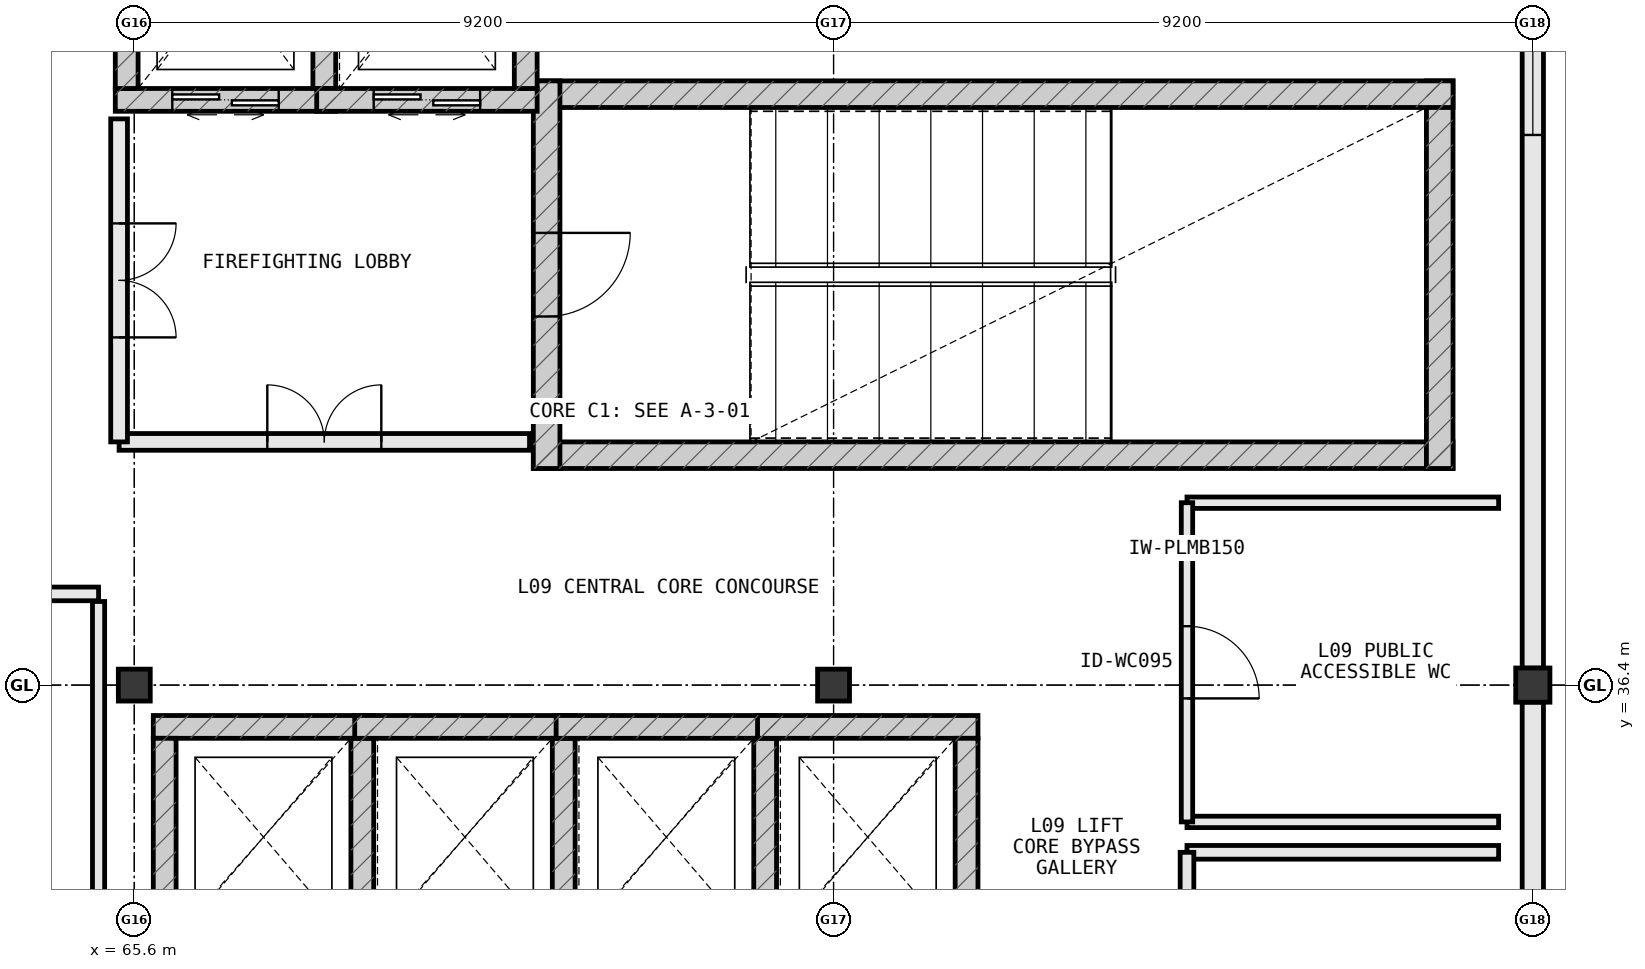
"""IFC4 building model, lengths in metres.
Left out: names, types, materials, properties, quantities, classifications, styles, units other than length and angle.
Written with IfcOpenShell. Run it as: python <this file> out.ifc"""

import sys

from ifc_helpers import new_model, si_unit, direction, frame, frame_2d, origin, origin_2d, place, context, subcontext, project, spatial, rectangle, extrude, element, fill, save


model = new_model("IFC4")
c1 = context("Model", 3, precision=1e-05, world=origin(), true_north=direction((0.0, 1.0)))
c2 = subcontext(c1, "Body", "Model", "MODEL_VIEW")
j1 = project(units=[si_unit("LENGTHUNIT", "METRE"), si_unit("PLANEANGLEUNIT", "RADIAN")], contexts=[c1])
p1 = place(None, origin())
s1 = spatial("IfcSite", under=j1, at=p1, CompositionType="ELEMENT")
p2 = place(p1, origin())
s2 = spatial("IfcBuilding", under=s1, at=p2, CompositionType="ELEMENT")
p3 = place(p2, frame((0.0, 0.0, 39.0)))
s3 = spatial("IfcBuildingStorey", under=s2, at=p3, CompositionType="ELEMENT", Elevation=39.0)
p4 = place(p3, frame((74.8, 36.4, 0.0), z_axis=(0.0, 0.0, 1.0), x_axis=(1.0, 0.0, 0.0)))
e1 = element("IfcColumn", 1, at=p4, inside=s3, PredefinedType="COLUMN", context=c2, shape_type="SweptSolid", body=[
    extrude(rectangle(XDim=0.42, YDim=0.42, at=origin_2d()), origin(), (0.0, 0.0, 1.0), 3.8),
])
p5 = place(p3, frame((84.0, 36.4, 0.0), z_axis=(0.0, 0.0, 1.0), x_axis=(1.0, 0.0, 0.0)))
e2 = element("IfcColumn", 2, at=p5, inside=s3, PredefinedType="COLUMN", context=c2, shape_type="SweptSolid", body=[
    extrude(rectangle(XDim=0.45, YDim=0.45, at=origin_2d()), origin(), (0.0, 0.0, 1.0), 3.8),
])
p6 = place(p3, frame((65.6, 36.4, 0.0), z_axis=(0.0, 0.0, 1.0), x_axis=(1.0, 0.0, 0.0)))
e3 = element("IfcColumn", 3, at=p6, inside=s3, PredefinedType="COLUMN", context=c2, shape_type="SweptSolid", body=[
    extrude(rectangle(XDim=0.42, YDim=0.42, at=origin_2d()), origin(), (0.0, 0.0, 1.0), 3.8),
])
p7 = place(p3, frame((84.0, 27.223, 0.0), z_axis=(0.0, 0.0, 1.0), x_axis=(0.0, 1.0, 0.0)))
e4 = element("IfcWall", 4, at=p7, inside=s3, PredefinedType="STANDARD", context=c2, shape_type="SweptSolid", body=[
    extrude(rectangle(XDim=8.954, YDim=0.28, at=frame_2d((4.477, 0.0))), origin(), (0.0, 0.0, 1.0), 2.98),
])
p8 = place(p7, frame((3.727, 0.0, 0.85)))
e5 = element("IfcOpeningElement", 5, at=p8, cuts=e4, PredefinedType="OPENING", context=c2, shape_type="SweptSolid", body=[
    extrude(rectangle(XDim=1.5, YDim=1.75, at=frame_2d((0.75, 0.875))), frame((0.0, 0.152, 0.0), z_axis=(0.0, -1.0, 0.0), x_axis=(1.0, 0.0, 0.0)), (0.0, 0.0, 1.0), 0.304),
])
p9 = place(p3, frame((84.0, 36.623, 0.0), z_axis=(0.0, 0.0, 1.0), x_axis=(0.0, 1.0, 0.0)))
e6 = element("IfcWall", 6, at=p9, inside=s3, PredefinedType="STANDARD", context=c2, shape_type="SweptSolid", body=[
    extrude(rectangle(XDim=10.354, YDim=0.28, at=frame_2d((5.177, 0.0))), origin(), (0.0, 0.0, 1.0), 2.98),
])
p10 = place(p9, frame((7.015, 0.0, 0.85)))
e7 = element("IfcOpeningElement", 7, at=p10, cuts=e6, PredefinedType="OPENING", context=c2, shape_type="SweptSolid", body=[
    extrude(rectangle(XDim=1.5, YDim=1.75, at=frame_2d((0.75, 0.875))), frame((0.0, 0.152, 0.0), z_axis=(0.0, -1.0, 0.0), x_axis=(1.0, 0.0, 0.0)), (0.0, 0.0, 1.0), 0.304),
])
p11 = place(p3, frame((70.85, 39.425, 0.0), z_axis=(0.0, 0.0, 1.0), x_axis=(1.0, 0.0, 0.0)))
e8 = element("IfcWall", 8, at=p11, inside=s3, PredefinedType="SHEAR", context=c2, shape_type="SweptSolid", body=[
    extrude(rectangle(XDim=12.1, YDim=0.35, at=frame_2d((6.05, 0.0))), origin(), (0.0, 0.0, 1.0), 3.8),
])
p12 = place(p3, frame((82.775, 39.25, 0.0), z_axis=(0.0, 0.0, 1.0), x_axis=(0.0, 1.0, 0.0)))
e9 = element("IfcWall", 9, at=p12, inside=s3, PredefinedType="SHEAR", context=c2, shape_type="SweptSolid", body=[
    extrude(rectangle(XDim=5.1, YDim=0.35, at=frame_2d((2.55, 0.0))), origin(), (0.0, 0.0, 1.0), 3.8),
])
p13 = place(p3, frame((82.95, 44.175, 0.0), z_axis=(0.0, 0.0, 1.0), x_axis=(-1.0, 0.0, 0.0)))
e10 = element("IfcWall", 10, at=p13, inside=s3, PredefinedType="SHEAR", context=c2, shape_type="SweptSolid", body=[
    extrude(rectangle(XDim=12.1, YDim=0.35, at=frame_2d((6.05, 0.0))), origin(), (0.0, 0.0, 1.0), 3.8),
])
p14 = place(p3, frame((71.025, 44.35, 0.0), z_axis=(0.0, 0.0, 1.0), x_axis=(0.0, -1.0, 0.0)))
e11 = element("IfcWall", 11, at=p14, inside=s3, PredefinedType="SHEAR", context=c2, shape_type="SweptSolid", body=[
    extrude(rectangle(XDim=5.1, YDim=0.35, at=frame_2d((2.55, 0.0))), origin(), (0.0, 0.0, 1.0), 3.8),
])
p15 = place(p14, frame((2.0, 0.0, 0.0)))
e12 = element("IfcOpeningElement", 12, at=p15, cuts=e11, PredefinedType="OPENING", context=c2, shape_type="SweptSolid", body=[
    extrude(rectangle(XDim=1.1, YDim=2.2, at=frame_2d((0.55, 1.1))), frame((0.0, 0.187, 0.0), z_axis=(0.0, -1.0, 0.0), x_axis=(1.0, 0.0, 0.0)), (0.0, 0.0, 1.0), 0.374),
])
p16 = place(p3, frame((65.35, 44.1, 0.0), z_axis=(0.0, 0.0, 1.0), x_axis=(1.0, 0.0, 0.0)))
e13 = element("IfcWall", 13, at=p16, inside=s3, PredefinedType="SHEAR", context=c2, shape_type="SweptSolid", body=[
    extrude(rectangle(XDim=2.9, YDim=0.3, at=frame_2d((1.45, 0.0))), origin(), (0.0, 0.0, 1.0), 3.8),
])
p17 = place(p16, frame((0.75, 0.0, 0.0)))
e14 = element("IfcOpeningElement", 14, at=p17, cuts=e13, PredefinedType="OPENING", context=c2, shape_type="SweptSolid", body=[
    extrude(rectangle(XDim=1.4, YDim=2.2, at=frame_2d((0.7, 1.1))), frame((0.0, 0.162, 0.0), z_axis=(0.0, -1.0, 0.0), x_axis=(1.0, 0.0, 0.0)), (0.0, 0.0, 1.0), 0.324),
])
for number, where, z_axis, x_axis in (
    (15, (68.1, 44.25, 0.0), (0.0, 0.0, 1.0), (0.0, 1.0, 0.0)),
    (16, (65.5, 47.15, 0.0), (0.0, 0.0, 1.0), (0.0, -1.0, 0.0)),
):
    element("IfcWall", number, at=place(p3, frame(where, z_axis=z_axis, x_axis=x_axis)), inside=s3, PredefinedType="SHEAR", context=c2, shape_type="SweptSolid", body=[
        extrude(rectangle(XDim=2.9, YDim=0.3, at=frame_2d((1.45, 0.0))), origin(), (0.0, 0.0, 1.0), 3.8),
    ])
p18 = place(p3, frame((68.0, 44.1, 0.0), z_axis=(0.0, 0.0, 1.0), x_axis=(1.0, 0.0, 0.0)))
e17 = element("IfcWall", 17, at=p18, inside=s3, PredefinedType="SHEAR", context=c2, shape_type="SweptSolid", body=[
    extrude(rectangle(XDim=2.9, YDim=0.3, at=frame_2d((1.45, 0.0))), origin(), (0.0, 0.0, 1.0), 3.8),
])
p19 = place(p18, frame((0.75, 0.0, 0.0)))
e18 = element("IfcOpeningElement", 18, at=p19, cuts=e17, PredefinedType="OPENING", context=c2, shape_type="SweptSolid", body=[
    extrude(rectangle(XDim=1.4, YDim=2.2, at=frame_2d((0.7, 1.1))), frame((0.0, 0.162, 0.0), z_axis=(0.0, -1.0, 0.0), x_axis=(1.0, 0.0, 0.0)), (0.0, 0.0, 1.0), 0.324),
])
for number, where, z_axis, x_axis in (
    (19, (70.75, 44.25, 0.0), (0.0, 0.0, 1.0), (0.0, 1.0, 0.0)),
    (20, (68.75, 35.85, 0.0), (0.0, 0.0, 1.0), (-1.0, 0.0, 0.0)),
):
    element("IfcWall", number, at=place(p3, frame(where, z_axis=z_axis, x_axis=x_axis)), inside=s3, PredefinedType="SHEAR", context=c2, shape_type="SweptSolid", body=[
        extrude(rectangle(XDim=2.9, YDim=0.3, at=frame_2d((1.45, 0.0))), origin(), (0.0, 0.0, 1.0), 3.8),
    ])
for number, where, z_axis, x_axis in (
    (21, (68.6, 33.1, 0.0), (0.0, 0.0, 1.0), (0.0, 1.0, 0.0)),
    (22, (66.0, 35.7, 0.0), (0.0, 0.0, 1.0), (0.0, -1.0, 0.0)),
):
    element("IfcWall", number, at=place(p3, frame(where, z_axis=z_axis, x_axis=x_axis)), inside=s3, PredefinedType="SHEAR", context=c2, shape_type="SweptSolid", body=[
        extrude(rectangle(XDim=2.6, YDim=0.3, at=frame_2d((1.3, 0.0))), origin(), (0.0, 0.0, 1.0), 3.8),
    ])
p20 = place(p3, frame((71.4, 35.85, 0.0), z_axis=(0.0, 0.0, 1.0), x_axis=(-1.0, 0.0, 0.0)))
e23 = element("IfcWall", 23, at=p20, inside=s3, PredefinedType="SHEAR", context=c2, shape_type="SweptSolid", body=[
    extrude(rectangle(XDim=2.9, YDim=0.3, at=frame_2d((1.45, 0.0))), origin(), (0.0, 0.0, 1.0), 3.8),
])
p21 = place(p3, frame((71.25, 33.1, 0.0), z_axis=(0.0, 0.0, 1.0), x_axis=(0.0, 1.0, 0.0)))
e24 = element("IfcWall", 24, at=p21, inside=s3, PredefinedType="SHEAR", context=c2, shape_type="SweptSolid", body=[
    extrude(rectangle(XDim=2.6, YDim=0.3, at=frame_2d((1.3, 0.0))), origin(), (0.0, 0.0, 1.0), 3.8),
])
p22 = place(p3, frame((74.05, 35.85, 0.0), z_axis=(0.0, 0.0, 1.0), x_axis=(-1.0, 0.0, 0.0)))
e25 = element("IfcWall", 25, at=p22, inside=s3, PredefinedType="SHEAR", context=c2, shape_type="SweptSolid", body=[
    extrude(rectangle(XDim=2.9, YDim=0.3, at=frame_2d((1.45, 0.0))), origin(), (0.0, 0.0, 1.0), 3.8),
])
p23 = place(p3, frame((73.9, 33.1, 0.0), z_axis=(0.0, 0.0, 1.0), x_axis=(0.0, 1.0, 0.0)))
e26 = element("IfcWall", 26, at=p23, inside=s3, PredefinedType="SHEAR", context=c2, shape_type="SweptSolid", body=[
    extrude(rectangle(XDim=2.6, YDim=0.3, at=frame_2d((1.3, 0.0))), origin(), (0.0, 0.0, 1.0), 3.8),
])
p24 = place(p3, frame((76.7, 35.85, 0.0), z_axis=(0.0, 0.0, 1.0), x_axis=(-1.0, 0.0, 0.0)))
e27 = element("IfcWall", 27, at=p24, inside=s3, PredefinedType="SHEAR", context=c2, shape_type="SweptSolid", body=[
    extrude(rectangle(XDim=2.9, YDim=0.3, at=frame_2d((1.45, 0.0))), origin(), (0.0, 0.0, 1.0), 3.8),
])
p25 = place(p3, frame((76.55, 33.1, 0.0), z_axis=(0.0, 0.0, 1.0), x_axis=(0.0, 1.0, 0.0)))
e28 = element("IfcWall", 28, at=p25, inside=s3, PredefinedType="SHEAR", context=c2, shape_type="SweptSolid", body=[
    extrude(rectangle(XDim=2.6, YDim=0.3, at=frame_2d((1.3, 0.0))), origin(), (0.0, 0.0, 1.0), 3.8),
])
p26 = place(p3, frame((65.4, 39.6, 0.0), z_axis=(0.0, 0.0, 1.0), x_axis=(1.0, 0.0, 0.0)))
e29 = element("IfcWall", 29, at=p26, inside=s3, PredefinedType="STANDARD", context=c2, shape_type="SweptSolid", body=[
    extrude(rectangle(XDim=5.4, YDim=0.22, at=frame_2d((2.7, 0.0))), origin(), (0.0, 0.0, 1.0), 3.565),
])
p27 = place(p26, frame((1.95, 0.0, 0.0)))
e30 = element("IfcOpeningElement", 30, at=p27, cuts=e29, PredefinedType="OPENING", context=c2, shape_type="SweptSolid", body=[
    extrude(rectangle(XDim=1.5, YDim=2.2, at=frame_2d((0.75, 1.1))), frame((0.0, 0.122, 0.0), z_axis=(0.0, -1.0, 0.0), x_axis=(1.0, 0.0, 0.0)), (0.0, 0.0, 1.0), 0.244),
])
p28 = place(p3, frame((65.4, 43.85, 0.0), z_axis=(0.0, 0.0, 1.0), x_axis=(0.0, -1.0, 0.0)))
e31 = element("IfcWall", 31, at=p28, inside=s3, PredefinedType="STANDARD", context=c2, shape_type="SweptSolid", body=[
    extrude(rectangle(XDim=4.25, YDim=0.22, at=frame_2d((2.125, 0.0))), origin(), (0.0, 0.0, 1.0), 3.565),
])
p29 = place(p28, frame((1.375, 0.0, 0.0)))
e32 = element("IfcOpeningElement", 32, at=p29, cuts=e31, PredefinedType="OPENING", context=c2, shape_type="SweptSolid", body=[
    extrude(rectangle(XDim=1.5, YDim=2.2, at=frame_2d((0.75, 1.1))), frame((0.0, 0.122, 0.0), z_axis=(0.0, -1.0, 0.0), x_axis=(1.0, 0.0, 0.0)), (0.0, 0.0, 1.0), 0.244),
])
p30 = place(p3, frame((83.55, 34.2, 0.0), z_axis=(0.0, 0.0, 1.0), x_axis=(-1.0, 0.0, 0.0)))
e33 = element("IfcWall", 33, at=p30, inside=s3, PredefinedType="PARTITIONING", context=c2, shape_type="SweptSolid", body=[
    extrude(rectangle(XDim=4.1, YDim=0.18, at=frame_2d((2.05, 0.0))), origin(), (0.0, 0.0, 1.0), 3.565),
])
p31 = place(p3, frame((79.45, 34.2, 0.0), z_axis=(0.0, 0.0, 1.0), x_axis=(0.0, -1.0, 0.0)))
e34 = element("IfcWall", 34, at=p31, inside=s3, PredefinedType="PARTITIONING", context=c2, shape_type="SweptSolid", body=[
    extrude(rectangle(XDim=4.4, YDim=0.18, at=frame_2d((2.2, 0.0))), origin(), (0.0, 0.0, 1.0), 3.565),
])
p32 = place(p31, frame((1.675, 0.0, 0.0)))
e35 = element("IfcOpeningElement", 35, at=p32, cuts=e34, PredefinedType="OPENING", context=c2, shape_type="SweptSolid", body=[
    extrude(rectangle(XDim=1.05, YDim=2.2, at=frame_2d((0.525, 1.1))), frame((0.0, 0.102, 0.0), z_axis=(0.0, -1.0, 0.0), x_axis=(1.0, 0.0, 0.0)), (0.0, 0.0, 1.0), 0.204),
])
for number, where, z_axis, x_axis in (
    (36, (79.45, 34.6, 0.0), (0.0, 0.0, 1.0), (1.0, 0.0, 0.0)),
    (37, (83.55, 38.8, 0.0), (0.0, 0.0, 1.0), (-1.0, 0.0, 0.0)),
):
    element("IfcWall", number, at=place(p3, frame(where, z_axis=z_axis, x_axis=x_axis)), inside=s3, PredefinedType="PLUMBINGWALL", context=c2, shape_type="SweptSolid", body=[
        extrude(rectangle(XDim=4.1, YDim=0.15, at=frame_2d((2.05, 0.0))), origin(), (0.0, 0.0, 1.0), 3.565),
    ])
p33 = place(p3, frame((79.45, 38.8, 0.0), z_axis=(0.0, 0.0, 1.0), x_axis=(0.0, -1.0, 0.0)))
e38 = element("IfcWall", 38, at=p33, inside=s3, PredefinedType="PLUMBINGWALL", context=c2, shape_type="SweptSolid", body=[
    extrude(rectangle(XDim=4.2, YDim=0.15, at=frame_2d((2.1, 0.0))), origin(), (0.0, 0.0, 1.0), 3.565),
])
p34 = place(p33, frame((1.625, 0.0, 0.0)))
e39 = element("IfcOpeningElement", 39, at=p34, cuts=e38, PredefinedType="OPENING", context=c2, shape_type="SweptSolid", body=[
    extrude(rectangle(XDim=0.95, YDim=2.15, at=frame_2d((0.475, 1.075))), frame((0.0, 0.087, 0.0), z_axis=(0.0, -1.0, 0.0), x_axis=(1.0, 0.0, 0.0)), (0.0, 0.0, 1.0), 0.174),
])
p35 = place(p3, frame((65.13, 37.6, 0.0), z_axis=(0.0, 0.0, 1.0), x_axis=(-1.0, 0.0, 0.0)))
e40 = element("IfcWall", 40, at=p35, inside=s3, PredefinedType="PARTITIONING", context=c2, shape_type="SweptSolid", body=[
    extrude(rectangle(XDim=4.3, YDim=0.18, at=frame_2d((2.15, 0.0))), origin(), (0.0, 0.0, 1.0), 3.565),
])
p36 = place(p35, frame((0.68, 0.0, 0.0)))
e41 = element("IfcOpeningElement", 41, at=p36, cuts=e40, PredefinedType="OPENING", context=c2, shape_type="SweptSolid", body=[
    extrude(rectangle(XDim=0.98, YDim=2.18, at=frame_2d((0.49, 1.09))), frame((0.0, 0.102, 0.0), z_axis=(0.0, -1.0, 0.0), x_axis=(1.0, 0.0, 0.0)), (0.0, 0.0, 1.0), 0.204),
])
p37 = place(p3, frame((65.13, 27.16, 0.0), z_axis=(0.0, 0.0, 1.0), x_axis=(0.0, 1.0, 0.0)))
e42 = element("IfcWall", 42, at=p37, inside=s3, PredefinedType="PARTITIONING", context=c2, shape_type="SweptSolid", body=[
    extrude(rectangle(XDim=10.34, YDim=0.16, at=frame_2d((5.17, 0.0))), origin(), (0.0, 0.0, 1.0), 3.565),
])
p38 = place(p10, origin())
e43 = element("IfcWindow", 43, at=p38, inside=s3, PartitioningType="SINGLE_PANEL", PredefinedType="WINDOW", context=c2, shape_type="SweptSolid", body=[
    extrude(rectangle(XDim=1.5, YDim=1.75, at=frame_2d((0.75, 0.875))), frame((0.0, 0.03, 0.0), z_axis=(0.0, -1.0, 0.0), x_axis=(1.0, 0.0, 0.0)), (0.0, 0.0, 1.0), 0.06),
])
fill(e7, e43)
p39 = place(p15, origin())
e44 = element("IfcDoor", 44, at=p39, inside=s3, OperationType="SINGLE_SWING_LEFT", PredefinedType="DOOR", context=c2, shape_type="SweptSolid", body=[
    extrude(rectangle(XDim=1.1, YDim=2.2, at=frame_2d((0.55, 1.1))), frame((0.0, 0.025, 0.0), z_axis=(0.0, -1.0, 0.0), x_axis=(1.0, 0.0, 0.0)), (0.0, 0.0, 1.0), 0.05),
])
fill(e12, e44)
p40 = place(p17, origin())
e45 = element("IfcDoor", 45, at=p40, inside=s3, OperationType="DOUBLE_DOOR_SLIDING", PredefinedType="DOOR", context=c2, shape_type="SweptSolid", body=[
    extrude(rectangle(XDim=1.4, YDim=2.2, at=frame_2d((0.7, 1.1))), frame((0.0, 0.025, 0.0), z_axis=(0.0, -1.0, 0.0), x_axis=(1.0, 0.0, 0.0)), (0.0, 0.0, 1.0), 0.05),
])
fill(e14, e45)
p41 = place(p19, origin())
e46 = element("IfcDoor", 46, at=p41, inside=s3, OperationType="DOUBLE_DOOR_SLIDING", PredefinedType="DOOR", context=c2, shape_type="SweptSolid", body=[
    extrude(rectangle(XDim=1.4, YDim=2.2, at=frame_2d((0.7, 1.1))), frame((0.0, 0.025, 0.0), z_axis=(0.0, -1.0, 0.0), x_axis=(1.0, 0.0, 0.0)), (0.0, 0.0, 1.0), 0.05),
])
fill(e18, e46)
p42 = place(p27, origin())
e47 = element("IfcDoor", 47, at=p42, inside=s3, OperationType="DOUBLE_DOOR_SINGLE_SWING", PredefinedType="DOOR", context=c2, shape_type="SweptSolid", body=[
    extrude(rectangle(XDim=1.5, YDim=2.2, at=frame_2d((0.75, 1.1))), frame((0.0, 0.025, 0.0), z_axis=(0.0, -1.0, 0.0), x_axis=(1.0, 0.0, 0.0)), (0.0, 0.0, 1.0), 0.05),
])
fill(e30, e47)
p43 = place(p29, origin())
e48 = element("IfcDoor", 48, at=p43, inside=s3, OperationType="DOUBLE_DOOR_SINGLE_SWING", PredefinedType="DOOR", context=c2, shape_type="SweptSolid", body=[
    extrude(rectangle(XDim=1.5, YDim=2.2, at=frame_2d((0.75, 1.1))), frame((0.0, 0.025, 0.0), z_axis=(0.0, -1.0, 0.0), x_axis=(1.0, 0.0, 0.0)), (0.0, 0.0, 1.0), 0.05),
])
fill(e32, e48)
p44 = place(p34, origin())
e49 = element("IfcDoor", 49, at=p44, inside=s3, OperationType="SINGLE_SWING_RIGHT", PredefinedType="DOOR", context=c2, shape_type="SweptSolid", body=[
    extrude(rectangle(XDim=0.95, YDim=2.15, at=frame_2d((0.475, 1.075))), frame((0.0, 0.025, 0.0), z_axis=(0.0, -1.0, 0.0), x_axis=(1.0, 0.0, 0.0)), (0.0, 0.0, 1.0), 0.05),
])
fill(e39, e49)
save(model, sys.argv[1])
